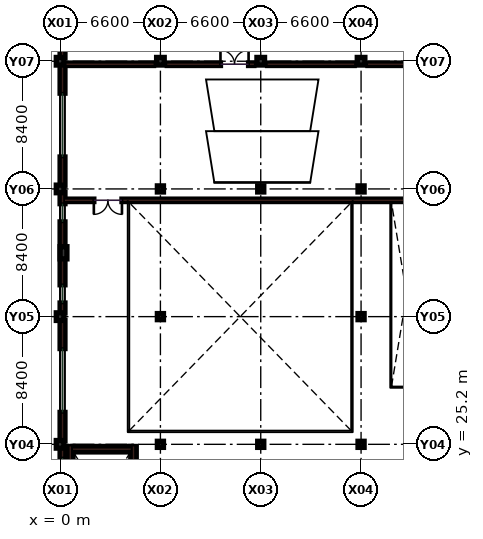
"""IFC4 building model, lengths in metres.
Left out: names, types, materials, properties, quantities, classifications, styles, units other than length and angle.
Written with IfcOpenShell. Run it as: python <this file> out.ifc"""

import sys

from ifc_helpers import new_model, si_unit, direction, frame, frame_2d, origin, origin_2d, place, context, subcontext, project, spatial, rectangle, extrude, element, fill, save


model = new_model("IFC4")
c1 = context("Model", 3, precision=1e-05, world=origin(), true_north=direction((0.0, 1.0)))
c2 = subcontext(c1, "Body", "Model", "MODEL_VIEW")
j1 = project(units=[si_unit("LENGTHUNIT", "METRE"), si_unit("PLANEANGLEUNIT", "RADIAN")], contexts=[c1])
p1 = place(None, origin())
s1 = spatial("IfcSite", under=j1, at=p1, CompositionType="ELEMENT")
p2 = place(p1, origin())
s2 = spatial("IfcBuilding", under=s1, at=p2, CompositionType="ELEMENT")
p3 = place(p2, frame((0.0, 0.0, 5.4)))
s3 = spatial("IfcBuildingStorey", under=s2, at=p3, CompositionType="ELEMENT", Elevation=5.4)
for number, where, z_axis, x_axis in (
    (1, (0.0, 25.2, 0.0), (0.0, 0.0, 1.0), (1.0, 0.0, 0.0)),
    (2, (0.0, 33.6, 0.0), (0.0, 0.0, 1.0), (1.0, 0.0, 0.0)),
    (3, (0.0, 42.0, 0.0), (0.0, 0.0, 1.0), (1.0, 0.0, 0.0)),
    (4, (0.0, 50.4, 0.0), (0.0, 0.0, 1.0), (1.0, 0.0, 0.0)),
):
    element("IfcColumn", number, at=place(p3, frame(where, z_axis=z_axis, x_axis=x_axis)), inside=s3, PredefinedType="COLUMN", context=c2, shape_type="SweptSolid", body=[
        extrude(rectangle(XDim=0.5, YDim=0.5, at=origin_2d()), origin(), (0.0, 0.0, 1.0), 4.5),
    ])
for number, where, z_axis, x_axis in (
    (5, (6.6, 25.2, 0.0), (0.0, 0.0, 1.0), (1.0, 0.0, 0.0)),
    (6, (6.6, 33.6, 0.0), (0.0, 0.0, 1.0), (1.0, 0.0, 0.0)),
    (7, (6.6, 42.0, 0.0), (0.0, 0.0, 1.0), (1.0, 0.0, 0.0)),
):
    element("IfcColumn", number, at=place(p3, frame(where, z_axis=z_axis, x_axis=x_axis)), inside=s3, PredefinedType="COLUMN", context=c2, shape_type="SweptSolid", body=[
        extrude(rectangle(XDim=0.4, YDim=0.4, at=origin_2d()), origin(), (0.0, 0.0, 1.0), 4.5),
    ])
p4 = place(p3, frame((6.6, 50.4, 0.0), z_axis=(0.0, 0.0, 1.0), x_axis=(1.0, 0.0, 0.0)))
e8 = element("IfcColumn", 8, at=p4, inside=s3, PredefinedType="COLUMN", context=c2, shape_type="SweptSolid", body=[
    extrude(rectangle(XDim=0.5, YDim=0.5, at=origin_2d()), origin(), (0.0, 0.0, 1.0), 4.5),
])
for number, where, z_axis, x_axis in (
    (9, (13.2, 25.2, 0.0), (0.0, 0.0, 1.0), (1.0, 0.0, 0.0)),
    (10, (13.2, 42.0, 0.0), (0.0, 0.0, 1.0), (1.0, 0.0, 0.0)),
):
    element("IfcColumn", number, at=place(p3, frame(where, z_axis=z_axis, x_axis=x_axis)), inside=s3, PredefinedType="COLUMN", context=c2, shape_type="SweptSolid", body=[
        extrude(rectangle(XDim=0.4, YDim=0.4, at=origin_2d()), origin(), (0.0, 0.0, 1.0), 4.5),
    ])
p5 = place(p3, frame((13.2, 50.4, 0.0), z_axis=(0.0, 0.0, 1.0), x_axis=(1.0, 0.0, 0.0)))
e11 = element("IfcColumn", 11, at=p5, inside=s3, PredefinedType="COLUMN", context=c2, shape_type="SweptSolid", body=[
    extrude(rectangle(XDim=0.5, YDim=0.5, at=origin_2d()), origin(), (0.0, 0.0, 1.0), 4.5),
])
for number, where, z_axis, x_axis in (
    (12, (19.8, 25.2, 0.0), (0.0, 0.0, 1.0), (1.0, 0.0, 0.0)),
    (13, (19.8, 33.6, 0.0), (0.0, 0.0, 1.0), (1.0, 0.0, 0.0)),
    (14, (19.8, 42.0, 0.0), (0.0, 0.0, 1.0), (1.0, 0.0, 0.0)),
):
    element("IfcColumn", number, at=place(p3, frame(where, z_axis=z_axis, x_axis=x_axis)), inside=s3, PredefinedType="COLUMN", context=c2, shape_type="SweptSolid", body=[
        extrude(rectangle(XDim=0.4, YDim=0.4, at=origin_2d()), origin(), (0.0, 0.0, 1.0), 4.5),
    ])
p6 = place(p3, frame((19.8, 50.4, 0.0), z_axis=(0.0, 0.0, 1.0), x_axis=(1.0, 0.0, 0.0)))
e15 = element("IfcColumn", 15, at=p6, inside=s3, PredefinedType="COLUMN", context=c2, shape_type="SweptSolid", body=[
    extrude(rectangle(XDim=0.5, YDim=0.5, at=origin_2d()), origin(), (0.0, 0.0, 1.0), 4.5),
])
p7 = place(p3, frame((0.225, 37.8, 0.0), z_axis=(0.0, 0.0, 1.0), x_axis=(1.0, 0.0, 0.0)))
e16 = element("IfcColumn", 16, at=p7, inside=s3, PredefinedType="PILASTER", context=c2, shape_type="SweptSolid", body=[
    extrude(rectangle(XDim=0.45, YDim=0.8, at=origin_2d()), origin(), (0.0, 0.0, 1.0), 4.5),
])
p8 = place(p3, frame((0.32, 41.25, 0.0), z_axis=(0.0, 0.0, 1.0), x_axis=(1.0, 0.0, 0.0)))
e17 = element("IfcWall", 17, at=p8, inside=s3, PredefinedType="PARTITIONING", context=c2, shape_type="SweptSolid", body=[
    extrude(rectangle(XDim=45.63, YDim=0.16, at=frame_2d((22.815, 0.0))), origin(), (0.0, 0.0, 1.0), 3.45),
])
p9 = place(p8, frame((1.9, 0.0, 0.0)))
e18 = element("IfcOpeningElement", 18, at=p9, cuts=e17, PredefinedType="OPENING", context=c2, shape_type="SweptSolid", body=[
    extrude(rectangle(XDim=1.85, YDim=2.25, at=frame_2d((0.925, 1.125))), frame((0.0, 0.09, 0.0), z_axis=(0.0, -1.0, 0.0), x_axis=(1.0, 0.0, 0.0)), (0.0, 0.0, 1.0), 0.18),
])
p10 = place(p8, frame((24.6, 0.0, 0.0)))
e19 = element("IfcOpeningElement", 19, at=p10, cuts=e17, PredefinedType="OPENING", context=c2, shape_type="SweptSolid", body=[
    extrude(rectangle(XDim=1.85, YDim=2.25, at=frame_2d((0.925, 1.125))), frame((0.0, 0.09, 0.0), z_axis=(0.0, -1.0, 0.0), x_axis=(1.0, 0.0, 0.0)), (0.0, 0.0, 1.0), 0.18),
])
p11 = place(p8, frame((43.2, 0.0, 0.0)))
e20 = element("IfcOpeningElement", 20, at=p11, cuts=e17, PredefinedType="OPENING", context=c2, shape_type="SweptSolid", body=[
    extrude(rectangle(XDim=1.85, YDim=2.25, at=frame_2d((0.925, 1.125))), frame((0.0, 0.09, 0.0), z_axis=(0.0, -1.0, 0.0), x_axis=(1.0, 0.0, 0.0)), (0.0, 0.0, 1.0), 0.18),
])
p12 = place(p3, frame((0.32, 50.2, 0.0), z_axis=(0.0, 0.0, 1.0), x_axis=(1.0, 0.0, 0.0)))
e21 = element("IfcWall", 21, at=p12, inside=s3, PredefinedType="PARTITIONING", context=c2, shape_type="SweptSolid", body=[
    extrude(rectangle(XDim=5.83, YDim=0.16, at=frame_2d((2.915, 0.0))), origin(), (0.0, 0.0, 1.0), 3.45),
])
p13 = place(p3, frame((7.05, 50.2, 0.0), z_axis=(0.0, 0.0, 1.0), x_axis=(1.0, 0.0, 0.0)))
e22 = element("IfcWall", 22, at=p13, inside=s3, PredefinedType="PARTITIONING", context=c2, shape_type="SweptSolid", body=[
    extrude(rectangle(XDim=5.7, YDim=0.16, at=frame_2d((2.85, 0.0))), origin(), (0.0, 0.0, 1.0), 3.45),
])
p14 = place(p13, frame((3.5, 0.0, 0.0)))
e23 = element("IfcOpeningElement", 23, at=p14, cuts=e22, PredefinedType="OPENING", context=c2, shape_type="SweptSolid", body=[
    extrude(rectangle(XDim=1.85, YDim=2.25, at=frame_2d((0.925, 1.125))), frame((0.0, 0.09, 0.0), z_axis=(0.0, -1.0, 0.0), x_axis=(1.0, 0.0, 0.0)), (0.0, 0.0, 1.0), 0.18),
])
p15 = place(p3, frame((13.65, 50.2, 0.0), z_axis=(0.0, 0.0, 1.0), x_axis=(1.0, 0.0, 0.0)))
e24 = element("IfcWall", 24, at=p15, inside=s3, PredefinedType="PARTITIONING", context=c2, shape_type="SweptSolid", body=[
    extrude(rectangle(XDim=5.7, YDim=0.16, at=frame_2d((2.85, 0.0))), origin(), (0.0, 0.0, 1.0), 3.45),
])
p16 = place(p3, frame((20.25, 50.2, 0.0), z_axis=(0.0, 0.0, 1.0), x_axis=(1.0, 0.0, 0.0)))
e25 = element("IfcWall", 25, at=p16, inside=s3, PredefinedType="PARTITIONING", context=c2, shape_type="SweptSolid", body=[
    extrude(rectangle(XDim=5.7, YDim=0.16, at=frame_2d((2.85, 0.0))), origin(), (0.0, 0.0, 1.0), 3.45),
])
p17 = place(p3, frame((0.16, 24.955, 0.0), z_axis=(0.0, 0.0, 1.0), x_axis=(0.0, -1.0, 0.0)))
e26 = element("IfcWall", 26, at=p17, inside=s3, PredefinedType="SOLIDWALL", context=c2, shape_type="SweptSolid", body=[
    extrude(rectangle(XDim=7.91, YDim=0.32, at=frame_2d((3.955, 0.0))), origin(), (0.0, 0.0, 1.0), 3.485),
])
p18 = place(p17, frame((0.65, 0.0, 0.95)))
e27 = element("IfcOpeningElement", 27, at=p18, cuts=e26, PredefinedType="OPENING", context=c2, shape_type="SweptSolid", body=[
    extrude(rectangle(XDim=1.2, YDim=1.5, at=frame_2d((0.6, 0.75))), frame((0.0, 0.17, 0.0), z_axis=(0.0, -1.0, 0.0), x_axis=(1.0, 0.0, 0.0)), (0.0, 0.0, 1.0), 0.34),
])
p19 = place(p17, frame((6.06, 0.0, 0.95)))
e28 = element("IfcOpeningElement", 28, at=p19, cuts=e26, PredefinedType="OPENING", context=c2, shape_type="SweptSolid", body=[
    extrude(rectangle(XDim=1.2, YDim=1.5, at=frame_2d((0.6, 0.75))), frame((0.0, 0.17, 0.0), z_axis=(0.0, -1.0, 0.0), x_axis=(1.0, 0.0, 0.0)), (0.0, 0.0, 1.0), 0.34),
])
p20 = place(p3, frame((0.16, 33.355, 0.0), z_axis=(0.0, 0.0, 1.0), x_axis=(0.0, -1.0, 0.0)))
e29 = element("IfcWall", 29, at=p20, inside=s3, PredefinedType="SOLIDWALL", context=c2, shape_type="SweptSolid", body=[
    extrude(rectangle(XDim=7.91, YDim=0.32, at=frame_2d((3.955, 0.0))), origin(), (0.0, 0.0, 1.0), 3.635),
])
p21 = place(p20, frame((1.855, 0.0, 1.45)))
e30 = element("IfcOpeningElement", 30, at=p21, cuts=e29, PredefinedType="OPENING", context=c2, shape_type="SweptSolid", body=[
    extrude(rectangle(XDim=4.2, YDim=1.1, at=frame_2d((2.1, 0.55))), frame((0.0, 0.17, 0.0), z_axis=(0.0, -1.0, 0.0), x_axis=(1.0, 0.0, 0.0)), (0.0, 0.0, 1.0), 0.34),
])
p22 = place(p3, frame((0.16, 41.755, 0.0), z_axis=(0.0, 0.0, 1.0), x_axis=(0.0, -1.0, 0.0)))
e31 = element("IfcWall", 31, at=p22, inside=s3, PredefinedType="SOLIDWALL", context=c2, shape_type="SweptSolid", body=[
    extrude(rectangle(XDim=7.91, YDim=0.32, at=frame_2d((3.955, 0.0))), origin(), (0.0, 0.0, 1.0), 3.485),
])
p23 = place(p22, frame((0.725, 0.0, 0.95)))
e32 = element("IfcOpeningElement", 32, at=p23, cuts=e31, PredefinedType="OPENING", context=c2, shape_type="SweptSolid", body=[
    extrude(rectangle(XDim=1.2, YDim=1.5, at=frame_2d((0.6, 0.75))), frame((0.0, 0.17, 0.0), z_axis=(0.0, -1.0, 0.0), x_axis=(1.0, 0.0, 0.0)), (0.0, 0.0, 1.0), 0.34),
])
p24 = place(p22, frame((6.06, 0.0, 0.95)))
e33 = element("IfcOpeningElement", 33, at=p24, cuts=e31, PredefinedType="OPENING", context=c2, shape_type="SweptSolid", body=[
    extrude(rectangle(XDim=1.2, YDim=1.5, at=frame_2d((0.6, 0.75))), frame((0.0, 0.17, 0.0), z_axis=(0.0, -1.0, 0.0), x_axis=(1.0, 0.0, 0.0)), (0.0, 0.0, 1.0), 0.34),
])
p25 = place(p3, frame((0.16, 50.155, 0.0), z_axis=(0.0, 0.0, 1.0), x_axis=(0.0, -1.0, 0.0)))
e34 = element("IfcWall", 34, at=p25, inside=s3, PredefinedType="SOLIDWALL", context=c2, shape_type="SweptSolid", body=[
    extrude(rectangle(XDim=7.91, YDim=0.32, at=frame_2d((3.955, 0.0))), origin(), (0.0, 0.0, 1.0), 3.635),
])
p26 = place(p25, frame((1.855, 0.0, 1.45)))
e35 = element("IfcOpeningElement", 35, at=p26, cuts=e34, PredefinedType="OPENING", context=c2, shape_type="SweptSolid", body=[
    extrude(rectangle(XDim=4.2, YDim=1.1, at=frame_2d((2.1, 0.55))), frame((0.0, 0.17, 0.0), z_axis=(0.0, -1.0, 0.0), x_axis=(1.0, 0.0, 0.0)), (0.0, 0.0, 1.0), 0.34),
])
p27 = place(p3, frame((0.16, 58.555, 0.0), z_axis=(0.0, 0.0, 1.0), x_axis=(0.0, -1.0, 0.0)))
e36 = element("IfcWall", 36, at=p27, inside=s3, PredefinedType="SOLIDWALL", context=c2, shape_type="SweptSolid", body=[
    extrude(rectangle(XDim=7.91, YDim=0.32, at=frame_2d((3.955, 0.0))), origin(), (0.0, 0.0, 1.0), 3.485),
])
p28 = place(p27, frame((0.65, 0.0, 0.95)))
e37 = element("IfcOpeningElement", 37, at=p28, cuts=e36, PredefinedType="OPENING", context=c2, shape_type="SweptSolid", body=[
    extrude(rectangle(XDim=1.2, YDim=1.5, at=frame_2d((0.6, 0.75))), frame((0.0, 0.17, 0.0), z_axis=(0.0, -1.0, 0.0), x_axis=(1.0, 0.0, 0.0)), (0.0, 0.0, 1.0), 0.34),
])
p29 = place(p27, frame((6.06, 0.0, 0.95)))
e38 = element("IfcOpeningElement", 38, at=p29, cuts=e36, PredefinedType="OPENING", context=c2, shape_type="SweptSolid", body=[
    extrude(rectangle(XDim=1.2, YDim=1.5, at=frame_2d((0.6, 0.75))), frame((0.0, 0.17, 0.0), z_axis=(0.0, -1.0, 0.0), x_axis=(1.0, 0.0, 0.0)), (0.0, 0.0, 1.0), 0.34),
])
p30 = place(p3, frame((0.67, 16.97, 0.0), z_axis=(0.0, 0.0, 1.0), x_axis=(0.0, 1.0, 0.0)))
e39 = element("IfcWall", 39, at=p30, inside=s3, PredefinedType="SHEAR", context=c2, shape_type="SweptSolid", body=[
    extrude(rectangle(XDim=8.09, YDim=0.36, at=frame_2d((4.045, 0.0))), origin(), (0.0, 0.0, 1.0), 4.2),
])
p31 = place(p3, frame((4.83, 16.97, 0.0), z_axis=(0.0, 0.0, 1.0), x_axis=(0.0, 1.0, 0.0)))
e40 = element("IfcWall", 40, at=p31, inside=s3, PredefinedType="SHEAR", context=c2, shape_type="SweptSolid", body=[
    extrude(rectangle(XDim=8.09, YDim=0.36, at=frame_2d((4.045, 0.0))), origin(), (0.0, 0.0, 1.0), 4.2),
])
p32 = place(p31, frame((0.45, 0.0, 0.0)))
e41 = element("IfcOpeningElement", 41, at=p32, cuts=e40, PredefinedType="OPENING", context=c2, shape_type="SweptSolid", body=[
    extrude(rectangle(XDim=1.25, YDim=2.15, at=frame_2d((0.625, 1.075))), frame((0.0, 0.19, 0.0), z_axis=(0.0, -1.0, 0.0), x_axis=(1.0, 0.0, 0.0)), (0.0, 0.0, 1.0), 0.38),
])
p33 = place(p3, frame((0.85, 24.88, 0.0), z_axis=(0.0, 0.0, 1.0), x_axis=(1.0, 0.0, 0.0)))
e42 = element("IfcWall", 42, at=p33, inside=s3, PredefinedType="SHEAR", context=c2, shape_type="SweptSolid", body=[
    extrude(rectangle(XDim=3.8, YDim=0.36, at=frame_2d((1.9, 0.0))), origin(), (0.0, 0.0, 1.0), 4.2),
])
p34 = place(p9, frame((1.85, 0.0, 0.0), z_axis=(0.0, 0.0, 1.0), x_axis=(-1.0, 0.0, 0.0)))
e43 = element("IfcDoor", 43, at=p34, inside=s3, OperationType="DOUBLE_DOOR_SINGLE_SWING", PredefinedType="DOOR", context=c2, shape_type="SweptSolid", body=[
    extrude(rectangle(XDim=1.85, YDim=2.25, at=frame_2d((0.925, 1.125))), frame((0.0, 0.025, 0.0), z_axis=(0.0, -1.0, 0.0), x_axis=(1.0, 0.0, 0.0)), (0.0, 0.0, 1.0), 0.05),
])
fill(e18, e43)
p35 = place(p14, origin())
e44 = element("IfcDoor", 44, at=p35, inside=s3, OperationType="DOUBLE_DOOR_SINGLE_SWING", PredefinedType="DOOR", context=c2, shape_type="SweptSolid", body=[
    extrude(rectangle(XDim=1.85, YDim=2.25, at=frame_2d((0.925, 1.125))), frame((0.0, 0.025, 0.0), z_axis=(0.0, -1.0, 0.0), x_axis=(1.0, 0.0, 0.0)), (0.0, 0.0, 1.0), 0.05),
])
fill(e23, e44)
p36 = place(p18, origin())
e45 = element("IfcWindow", 45, at=p36, inside=s3, PartitioningType="SINGLE_PANEL", PredefinedType="WINDOW", context=c2, shape_type="SweptSolid", body=[
    extrude(rectangle(XDim=1.2, YDim=1.5, at=frame_2d((0.6, 0.75))), frame((0.0, 0.03, 0.0), z_axis=(0.0, -1.0, 0.0), x_axis=(1.0, 0.0, 0.0)), (0.0, 0.0, 1.0), 0.06),
])
fill(e27, e45)
p37 = place(p21, origin())
e46 = element("IfcWindow", 46, at=p37, inside=s3, PartitioningType="SINGLE_PANEL", PredefinedType="WINDOW", context=c2, shape_type="SweptSolid", body=[
    extrude(rectangle(XDim=4.2, YDim=1.1, at=frame_2d((2.1, 0.55))), frame((0.0, 0.03, 0.0), z_axis=(0.0, -1.0, 0.0), x_axis=(1.0, 0.0, 0.0)), (0.0, 0.0, 1.0), 0.06),
])
fill(e30, e46)
p38 = place(p23, origin())
e47 = element("IfcWindow", 47, at=p38, inside=s3, PartitioningType="SINGLE_PANEL", PredefinedType="WINDOW", context=c2, shape_type="SweptSolid", body=[
    extrude(rectangle(XDim=1.2, YDim=1.5, at=frame_2d((0.6, 0.75))), frame((0.0, 0.03, 0.0), z_axis=(0.0, -1.0, 0.0), x_axis=(1.0, 0.0, 0.0)), (0.0, 0.0, 1.0), 0.06),
])
fill(e32, e47)
p39 = place(p24, origin())
e48 = element("IfcWindow", 48, at=p39, inside=s3, PartitioningType="SINGLE_PANEL", PredefinedType="WINDOW", context=c2, shape_type="SweptSolid", body=[
    extrude(rectangle(XDim=1.2, YDim=1.5, at=frame_2d((0.6, 0.75))), frame((0.0, 0.03, 0.0), z_axis=(0.0, -1.0, 0.0), x_axis=(1.0, 0.0, 0.0)), (0.0, 0.0, 1.0), 0.06),
])
fill(e33, e48)
p40 = place(p26, origin())
e49 = element("IfcWindow", 49, at=p40, inside=s3, PartitioningType="SINGLE_PANEL", PredefinedType="WINDOW", context=c2, shape_type="SweptSolid", body=[
    extrude(rectangle(XDim=4.2, YDim=1.1, at=frame_2d((2.1, 0.55))), frame((0.0, 0.03, 0.0), z_axis=(0.0, -1.0, 0.0), x_axis=(1.0, 0.0, 0.0)), (0.0, 0.0, 1.0), 0.06),
])
fill(e35, e49)
save(model, sys.argv[1])
